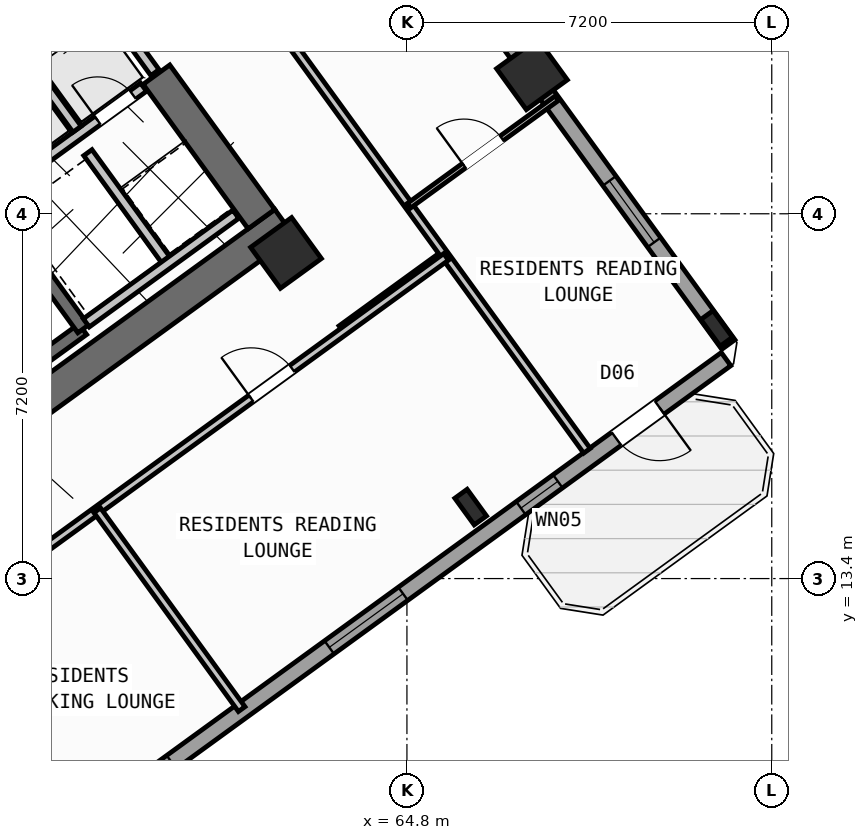
"""IFC4 building model, lengths in metres.
Left out: names, types, materials, properties, quantities, classifications, styles, units other than length and angle.
Written with IfcOpenShell. Run it as: python <this file> out.ifc"""

import sys

from ifc_helpers import new_model, si_unit, direction, frame, frame_2d, origin, origin_2d, place, context, subcontext, project, spatial, rectangle, hollow_rectangle, i_section, extrude, source, transform, mapped, element, fill, save


model = new_model("IFC4")
c1 = context("Model", 3, precision=1e-05, world=origin(), true_north=direction((0.0, 1.0)))
c2 = subcontext(c1, "Body", "Model", "MODEL_VIEW")
j1 = project(units=[si_unit("LENGTHUNIT", "METRE"), si_unit("PLANEANGLEUNIT", "RADIAN")], contexts=[c1])
p1 = place(None, origin())
s1 = spatial("IfcSite", under=j1, at=p1, CompositionType="ELEMENT")
p2 = place(p1, origin())
s2 = spatial("IfcBuilding", under=s1, at=p2, CompositionType="ELEMENT")
p3 = place(p2, frame((0.0, 0.0, 42.0)))
s3 = spatial("IfcBuildingStorey", under=s2, at=p3, CompositionType="ELEMENT", Elevation=42.0)
p4 = place(p3, frame((52.318, 13.11, 0.0), z_axis=(0.0, 0.0, 1.0), x_axis=(0.809019445368, 0.587781878776, 0.0)))
e1 = element("IfcWall", 1, at=p4, inside=s3, PredefinedType="SHEAR", context=c2, shape_type="SweptSolid", body=[
    extrude(rectangle(XDim=12.44, YDim=0.65, at=frame_2d((6.22, 0.0))), origin(), (0.0, 0.0, 1.0), 3.35),
])
p5 = place(p3, frame((61.929, 20.494, 0.0), z_axis=(0.0, 0.0, 1.0), x_axis=(-0.58782982593, 0.808984607855, 0.0)))
e2 = element("IfcWall", 2, at=p5, inside=s3, PredefinedType="SHEAR", context=c2, shape_type="SweptSolid", body=[
    extrude(rectangle(XDim=3.525, YDim=0.65, at=frame_2d((1.762, 0.0))), origin(), (0.0, 0.0, 1.0), 3.35),
])
m1 = source(origin(), c2, "Body", "SweptSolid", [
    extrude(i_section(OverallWidth=0.3, OverallDepth=0.65, WebThickness=0.016, FlangeThickness=0.031, at=origin_2d()), origin(), (0.0, 0.0, 1.0), 3.6),
])
p6 = place(p3, frame((66.058, 14.811, 0.0), z_axis=(0.0, 0.0, 1.0), x_axis=(0.809016994375, 0.587785252292, 0.0)))
e3 = element("IfcColumn", 3, at=p6, inside=s3, PredefinedType="COLUMN", context=c2, shape_type="MappedRepresentation", body=[
    mapped(m1, transform((0.0, 0.0, 0.0), scale=1.0)),
])
m2 = source(origin(), c2, "Body", "SweptSolid", [
    extrude(hollow_rectangle(XDim=1.0, YDim=1.0, WallThickness=0.04, at=origin_2d()), origin(), (0.0, 0.0, 1.0), 3.6),
])
p7 = place(p3, frame((62.414, 19.827, 0.0), z_axis=(0.0, 0.0, 1.0), x_axis=(0.809016994375, 0.587785252292, 0.0)))
e4 = element("IfcColumn", 4, at=p7, inside=s3, PredefinedType="COLUMN", context=c2, shape_type="MappedRepresentation", body=[
    mapped(m2, transform((0.0, 0.0, 0.0), scale=1.0)),
])
p8 = place(p3, frame((70.912, 18.338, 0.0), z_axis=(0.0, 0.0, 1.0), x_axis=(0.809016994375, 0.587785252292, 0.0)))
e5 = element("IfcColumn", 5, at=p8, inside=s3, PredefinedType="COLUMN", context=c2, shape_type="MappedRepresentation", body=[
    mapped(m1, transform((0.0, 0.0, 0.0), scale=1.0)),
])
p9 = place(p3, frame((67.268, 23.354, 0.0), z_axis=(0.0, 0.0, 1.0), x_axis=(0.809016994375, 0.587785252292, 0.0)))
e6 = element("IfcColumn", 6, at=p9, inside=s3, PredefinedType="COLUMN", context=c2, shape_type="MappedRepresentation", body=[
    mapped(m2, transform((0.0, 0.0, 0.0), scale=1.0)),
])
p10 = place(p3, frame((58.455, 35.484, 0.0), z_axis=(0.0, 0.0, 1.0), x_axis=(0.587783625747, -0.809018176127, 0.0)))
e7 = element("IfcWall", 7, at=p10, inside=s3, PredefinedType="STANDARD", context=c2, shape_type="SweptSolid", body=[
    extrude(rectangle(XDim=21.587, YDim=0.32, at=frame_2d((10.794, 0.0))), origin(), (0.0, 0.0, 1.0), 2.725),
])
p11 = place(p10, frame((1.529, 0.0, 0.85)))
e8 = element("IfcOpeningElement", 8, at=p11, cuts=e7, PredefinedType="OPENING", context=c2, shape_type="SweptSolid", body=[
    extrude(rectangle(XDim=1.8, YDim=1.5, at=frame_2d((0.9, 0.75))), frame((0.0, 0.17, 0.0), z_axis=(0.0, -1.0, 0.0), x_axis=(1.0, 0.0, 0.0)), (0.0, 0.0, 1.0), 0.34),
])
p12 = place(p10, frame((10.444, 0.0, 0.85)))
e9 = element("IfcOpeningElement", 9, at=p12, cuts=e7, PredefinedType="OPENING", context=c2, shape_type="SweptSolid", body=[
    extrude(rectangle(XDim=1.8, YDim=1.5, at=frame_2d((0.9, 0.75))), frame((0.0, 0.17, 0.0), z_axis=(0.0, -1.0, 0.0), x_axis=(1.0, 0.0, 0.0)), (0.0, 0.0, 1.0), 0.34),
])
p13 = place(p10, frame((17.595, 0.0, 0.85)))
e10 = element("IfcOpeningElement", 10, at=p13, cuts=e7, PredefinedType="OPENING", context=c2, shape_type="SweptSolid", body=[
    extrude(rectangle(XDim=1.5, YDim=1.5, at=frame_2d((0.75, 0.75))), frame((0.0, 0.17, 0.0), z_axis=(0.0, -1.0, 0.0), x_axis=(1.0, 0.0, 0.0)), (0.0, 0.0, 1.0), 0.34),
])
p14 = place(p3, frame((71.098, 17.731, 0.0), z_axis=(0.0, 0.0, 1.0), x_axis=(-0.809021120468, -0.587779573171, 0.0)))
e11 = element("IfcWall", 11, at=p14, inside=s3, PredefinedType="STANDARD", context=c2, shape_type="SweptSolid", body=[
    extrude(rectangle(XDim=17.588, YDim=0.32, at=frame_2d((8.794, 0.0))), origin(), (0.0, 0.0, 1.0), 3.35),
])
p15 = place(p14, frame((1.624, 0.0, 0.0)))
e12 = element("IfcOpeningElement", 12, at=p15, cuts=e11, PredefinedType="OPENING", context=c2, shape_type="SweptSolid", body=[
    extrude(rectangle(XDim=1.05, YDim=2.15, at=frame_2d((0.525, 1.075))), frame((0.0, 0.17, 0.0), z_axis=(0.0, -1.0, 0.0), x_axis=(1.0, 0.0, 0.0)), (0.0, 0.0, 1.0), 0.34),
])
p16 = place(p14, frame((4.104, 0.0, 1.0)))
e13 = element("IfcOpeningElement", 13, at=p16, cuts=e11, PredefinedType="OPENING", context=c2, shape_type="SweptSolid", body=[
    extrude(rectangle(XDim=0.9, YDim=1.25, at=frame_2d((0.45, 0.625))), frame((0.0, 0.17, 0.0), z_axis=(0.0, -1.0, 0.0), x_axis=(1.0, 0.0, 0.0)), (0.0, 0.0, 1.0), 0.34),
])
p17 = place(p14, frame((7.879, 0.0, 0.85)))
e14 = element("IfcOpeningElement", 14, at=p17, cuts=e11, PredefinedType="OPENING", context=c2, shape_type="SweptSolid", body=[
    extrude(rectangle(XDim=1.8, YDim=1.5, at=frame_2d((0.9, 0.75))), frame((0.0, 0.17, 0.0), z_axis=(0.0, -1.0, 0.0), x_axis=(1.0, 0.0, 0.0)), (0.0, 0.0, 1.0), 0.34),
])
p18 = place(p14, frame((13.529, 0.0, 0.85)))
e15 = element("IfcOpeningElement", 15, at=p18, cuts=e11, PredefinedType="OPENING", context=c2, shape_type="SweptSolid", body=[
    extrude(rectangle(XDim=1.5, YDim=1.5, at=frame_2d((0.75, 0.75))), frame((0.0, 0.17, 0.0), z_axis=(0.0, -1.0, 0.0), x_axis=(1.0, 0.0, 0.0)), (0.0, 0.0, 1.0), 0.34),
])
p19 = place(p3, frame((52.472, 14.013, 0.0), z_axis=(0.0, 0.0, 1.0), x_axis=(0.809028366311, 0.587769599847, 0.0)))
e16 = element("IfcWall", 16, at=p19, inside=s3, PredefinedType="SHEAR", context=c2, shape_type="SweptSolid", body=[
    extrude(rectangle(XDim=7.33, YDim=0.26, at=frame_2d((3.665, 0.0))), origin(), (0.0, 0.0, 1.0), 3.35),
])
p20 = place(p3, frame((58.41, 18.327, 0.0), z_axis=(0.0, 0.0, 1.0), x_axis=(-0.58776738483, 0.809029975545, 0.0)))
e17 = element("IfcWall", 17, at=p20, inside=s3, PredefinedType="SHEAR", context=c2, shape_type="SweptSolid", body=[
    extrude(rectangle(XDim=3.16, YDim=0.26, at=frame_2d((1.58, 0.0))), origin(), (0.0, 0.0, 1.0), 3.35),
])
p21 = place(p3, frame((56.553, 20.884, 0.0), z_axis=(0.0, 0.0, 1.0), x_axis=(0.809035789462, 0.587759382205, 0.0)))
e18 = element("IfcWall", 18, at=p21, inside=s3, PredefinedType="STANDARD", context=c2, shape_type="SweptSolid", body=[
    extrude(rectangle(XDim=3.768, YDim=0.2, at=frame_2d((1.884, 0.0))), origin(), (0.0, 0.0, 1.0), 3.34),
])
p22 = place(p21, frame((2.65, 0.0, 0.0)))
e19 = element("IfcOpeningElement", 19, at=p22, cuts=e18, PredefinedType="OPENING", context=c2, shape_type="SweptSolid", body=[
    extrude(rectangle(XDim=0.86, YDim=2.05, at=frame_2d((0.43, 1.025))), frame((0.0, 0.11, 0.0), z_axis=(0.0, -1.0, 0.0), x_axis=(1.0, 0.0, 0.0)), (0.0, 0.0, 1.0), 0.22),
])
p23 = place(p3, frame((54.421, 21.436, 0.0), z_axis=(0.0, 0.0, 1.0), x_axis=(0.809013710463, 0.587789772183, 0.0)))
e20 = element("IfcWall", 20, at=p23, inside=s3, PredefinedType="STANDARD", context=c2, shape_type="SweptSolid", body=[
    extrude(rectangle(XDim=5.36, YDim=0.2, at=frame_2d((2.68, 0.0))), origin(), (0.0, 0.0, 1.0), 3.34),
])
p24 = place(p23, frame((0.37, 0.0, 0.0)))
e21 = element("IfcOpeningElement", 21, at=p24, cuts=e20, PredefinedType="OPENING", context=c2, shape_type="SweptSolid", body=[
    extrude(rectangle(XDim=1.1, YDim=2.15, at=frame_2d((0.55, 1.075))), frame((0.0, 0.11, 0.0), z_axis=(0.0, -1.0, 0.0), x_axis=(1.0, 0.0, 0.0)), (0.0, 0.0, 1.0), 0.22),
])
p25 = place(p23, frame((2.17, 0.0, 0.0)))
e22 = element("IfcOpeningElement", 22, at=p25, cuts=e20, PredefinedType="OPENING", context=c2, shape_type="SweptSolid", body=[
    extrude(rectangle(XDim=1.1, YDim=2.15, at=frame_2d((0.55, 1.075))), frame((0.0, 0.11, 0.0), z_axis=(0.0, -1.0, 0.0), x_axis=(1.0, 0.0, 0.0)), (0.0, 0.0, 1.0), 0.22),
])
p26 = place(p23, frame((3.97, 0.0, 0.0)))
e23 = element("IfcOpeningElement", 23, at=p26, cuts=e20, PredefinedType="OPENING", context=c2, shape_type="SweptSolid", body=[
    extrude(rectangle(XDim=1.1, YDim=2.15, at=frame_2d((0.55, 1.075))), frame((0.0, 0.11, 0.0), z_axis=(0.0, -1.0, 0.0), x_axis=(1.0, 0.0, 0.0)), (0.0, 0.0, 1.0), 0.22),
])
p27 = place(p3, frame((58.29, 22.27, 0.0), z_axis=(0.0, 0.0, 1.0), x_axis=(-0.587840865826, 0.808976585857, 0.0)))
e24 = element("IfcWall", 24, at=p27, inside=s3, PredefinedType="STANDARD", context=c2, shape_type="SweptSolid", body=[
    extrude(rectangle(XDim=1.58, YDim=0.2, at=frame_2d((0.79, 0.0))), origin(), (0.0, 0.0, 1.0), 3.34),
])
p28 = place(p3, frame((60.067, 19.655, 0.0), z_axis=(0.0, 0.0, 1.0), x_axis=(-0.587800520745, 0.809005900975, 0.0)))
e25 = element("IfcWall", 25, at=p28, inside=s3, PredefinedType="STANDARD", context=c2, shape_type="SweptSolid", body=[
    extrude(rectangle(XDim=2.66, YDim=0.2, at=frame_2d((1.33, 0.0))), origin(), (0.0, 0.0, 1.0), 3.34),
])
p29 = place(p3, frame((58.472, 18.447, 0.0), z_axis=(0.0, 0.0, 1.0), x_axis=(0.809022487728, 0.587777691266, 0.0)))
e26 = element("IfcWall", 26, at=p29, inside=s3, PredefinedType="STANDARD", context=c2, shape_type="SweptSolid", body=[
    extrude(rectangle(XDim=3.648, YDim=0.2, at=frame_2d((1.824, 0.0))), origin(), (0.0, 0.0, 1.0), 3.34),
])
p30 = place(p3, frame((53.425, 22.468, 0.0), z_axis=(0.0, 0.0, 1.0), x_axis=(0.80902705128, 0.587771409902, 0.0)))
e27 = element("IfcWall", 27, at=p30, inside=s3, PredefinedType="STANDARD", context=c2, shape_type="SweptSolid", body=[
    extrude(rectangle(XDim=5.368, YDim=0.2, at=frame_2d((2.684, 0.0))), origin(), (0.0, 0.0, 1.0), 3.34),
])
p31 = place(p30, frame((4.28, 0.0, 0.0)))
e28 = element("IfcOpeningElement", 28, at=p31, cuts=e27, PredefinedType="OPENING", context=c2, shape_type="SweptSolid", body=[
    extrude(rectangle(XDim=0.86, YDim=2.05, at=frame_2d((0.43, 1.025))), frame((0.0, 0.11, 0.0), z_axis=(0.0, -1.0, 0.0), x_axis=(1.0, 0.0, 0.0)), (0.0, 0.0, 1.0), 0.22),
])
p32 = place(p30, frame((0.35, 0.0, 0.0)))
e29 = element("IfcOpeningElement", 29, at=p32, cuts=e27, PredefinedType="OPENING", context=c2, shape_type="SweptSolid", body=[
    extrude(rectangle(XDim=0.86, YDim=2.05, at=frame_2d((0.43, 1.025))), frame((0.0, 0.11, 0.0), z_axis=(0.0, -1.0, 0.0), x_axis=(1.0, 0.0, 0.0)), (0.0, 0.0, 1.0), 0.22),
])
p33 = place(p3, frame((59.827, 23.386, 0.0), z_axis=(0.0, 0.0, 1.0), x_axis=(-0.587803840107, 0.809003489211, 0.0)))
e30 = element("IfcWall", 30, at=p33, inside=s3, PredefinedType="STANDARD", context=c2, shape_type="SweptSolid", body=[
    extrude(rectangle(XDim=2.96, YDim=0.2, at=frame_2d((1.48, 0.0))), origin(), (0.0, 0.0, 1.0), 3.34),
])
p34 = place(p33, frame((1.68, 0.0, 0.0)))
e31 = element("IfcOpeningElement", 31, at=p34, cuts=e30, PredefinedType="OPENING", context=c2, shape_type="SweptSolid", body=[
    extrude(rectangle(XDim=1.0, YDim=2.1, at=frame_2d((0.5, 1.05))), frame((0.0, 0.11, 0.0), z_axis=(0.0, -1.0, 0.0), x_axis=(1.0, 0.0, 0.0)), (0.0, 0.0, 1.0), 0.22),
])
p35 = place(p3, frame((63.507, 18.322, 0.0), z_axis=(0.0, 0.0, 1.0), x_axis=(0.809034604122, 0.587761013791, 0.0)))
e32 = element("IfcWall", 32, at=p35, inside=s3, PredefinedType="PARTITIONING", context=c2, shape_type="SweptSolid", body=[
    extrude(rectangle(XDim=2.51, YDim=0.16, at=frame_2d((1.255, 0.0))), origin(), (0.0, 0.0, 1.0), 3.34),
])
p36 = place(p3, frame((68.353, 15.922, 0.0), z_axis=(0.0, 0.0, 1.0), x_axis=(-0.587782002009, 0.809019355834, 0.0)))
e33 = element("IfcWall", 33, at=p36, inside=s3, PredefinedType="PARTITIONING", context=c2, shape_type="SweptSolid", body=[
    extrude(rectangle(XDim=15.35, YDim=0.16, at=frame_2d((7.675, 0.0))), origin(), (0.0, 0.0, 1.0), 3.34),
])
p37 = place(p3, frame((64.839, 20.759, 0.0), z_axis=(0.0, 0.0, 1.0), x_axis=(0.809013833588, 0.587789602718, 0.0)))
e34 = element("IfcWall", 34, at=p37, inside=s3, PredefinedType="PARTITIONING", context=c2, shape_type="SweptSolid", body=[
    extrude(rectangle(XDim=3.61, YDim=0.11, at=frame_2d((1.805, 0.0))), origin(), (0.0, 0.0, 1.0), 3.34),
])
p38 = place(p37, frame((1.345, 0.0, 0.0)))
e35 = element("IfcOpeningElement", 35, at=p38, cuts=e34, PredefinedType="OPENING", context=c2, shape_type="SweptSolid", body=[
    extrude(rectangle(XDim=0.92, YDim=2.08, at=frame_2d((0.46, 1.04))), frame((0.0, 0.065, 0.0), z_axis=(0.0, -1.0, 0.0), x_axis=(1.0, 0.0, 0.0)), (0.0, 0.0, 1.0), 0.13),
])
p39 = place(p3, frame((53.705, 11.126, 0.0), z_axis=(0.0, 0.0, 1.0), x_axis=(0.809014504436, 0.587788679384, 0.0)))
e36 = element("IfcWall", 36, at=p39, inside=s3, PredefinedType="PARTITIONING", context=c2, shape_type="SweptSolid", body=[
    extrude(rectangle(XDim=14.67, YDim=0.16, at=frame_2d((7.335, 0.0))), origin(), (0.0, 0.0, 1.0), 3.34),
])
p40 = place(p39, frame((3.215, 0.0, 0.0)))
e37 = element("IfcOpeningElement", 37, at=p40, cuts=e36, PredefinedType="OPENING", context=c2, shape_type="SweptSolid", body=[
    extrude(rectangle(XDim=1.0, YDim=2.1, at=frame_2d((0.5, 1.05))), frame((0.0, 0.09, 0.0), z_axis=(0.0, -1.0, 0.0), x_axis=(1.0, 0.0, 0.0)), (0.0, 0.0, 1.0), 0.18),
])
p41 = place(p39, frame((9.915, 0.0, 0.0)))
e38 = element("IfcOpeningElement", 38, at=p41, cuts=e36, PredefinedType="OPENING", context=c2, shape_type="SweptSolid", body=[
    extrude(rectangle(XDim=1.0, YDim=2.1, at=frame_2d((0.5, 1.05))), frame((0.0, 0.09, 0.0), z_axis=(0.0, -1.0, 0.0), x_axis=(1.0, 0.0, 0.0)), (0.0, 0.0, 1.0), 0.18),
])
p42 = place(p3, frame((57.747, 7.586, 0.0), z_axis=(0.0, 0.0, 1.0), x_axis=(-0.587784893399, 0.809017255126, 0.0)))
e39 = element("IfcWall", 39, at=p42, inside=s3, PredefinedType="PARTITIONING", context=c2, shape_type="SweptSolid", body=[
    extrude(rectangle(XDim=5.48, YDim=0.16, at=frame_2d((2.74, 0.0))), origin(), (0.0, 0.0, 1.0), 3.34),
])
p43 = place(p3, frame((61.539, 10.823, 0.0), z_axis=(0.0, 0.0, 1.0), x_axis=(-0.587785532001, 0.809016791155, 0.0)))
e40 = element("IfcWall", 40, at=p43, inside=s3, PredefinedType="PARTITIONING", context=c2, shape_type="SweptSolid", body=[
    extrude(rectangle(XDim=4.85, YDim=0.16, at=frame_2d((2.425, 0.0))), origin(), (0.0, 0.0, 1.0), 3.34),
])
m3 = source(origin(), c2, "Body", "SweptSolid", [
    extrude(rectangle(XDim=1.05, YDim=2.15, at=frame_2d((0.525, 1.075))), frame((0.0, 0.025, 0.0), z_axis=(0.0, -1.0, 0.0), x_axis=(1.0, 0.0, 0.0)), (0.0, 0.0, 1.0), 0.05),
])
p44 = place(p15, origin())
e41 = element("IfcDoor", 41, at=p44, inside=s3, OperationType="SINGLE_SWING_LEFT", PredefinedType="DOOR", context=c2, shape_type="MappedRepresentation", body=[
    mapped(m3, transform((0.0, 0.0, 0.0), scale=1.0)),
])
fill(e12, e41)
m4 = source(origin(), c2, "Body", "SweptSolid", [
    extrude(rectangle(XDim=1.5, YDim=1.5, at=frame_2d((0.75, 0.75))), frame((0.0, 0.03, 0.0), z_axis=(0.0, -1.0, 0.0), x_axis=(1.0, 0.0, 0.0)), (0.0, 0.0, 1.0), 0.06),
])
p45 = place(p13, origin())
e42 = element("IfcWindow", 42, at=p45, inside=s3, PartitioningType="SINGLE_PANEL", PredefinedType="WINDOW", context=c2, shape_type="MappedRepresentation", body=[
    mapped(m4, transform((0.0, 0.0, 0.0), scale=1.0)),
])
fill(e10, e42)
m5 = source(origin(), c2, "Body", "SweptSolid", [
    extrude(rectangle(XDim=0.9, YDim=1.25, at=frame_2d((0.45, 0.625))), frame((0.0, 0.03, 0.0), z_axis=(0.0, -1.0, 0.0), x_axis=(1.0, 0.0, 0.0)), (0.0, 0.0, 1.0), 0.06),
])
p46 = place(p16, origin())
e43 = element("IfcWindow", 43, at=p46, inside=s3, PartitioningType="SINGLE_PANEL", PredefinedType="WINDOW", context=c2, shape_type="MappedRepresentation", body=[
    mapped(m5, transform((0.0, 0.0, 0.0), scale=1.0)),
])
fill(e13, e43)
m6 = source(origin(), c2, "Body", "SweptSolid", [
    extrude(rectangle(XDim=1.8, YDim=1.5, at=frame_2d((0.9, 0.75))), frame((0.0, 0.03, 0.0), z_axis=(0.0, -1.0, 0.0), x_axis=(1.0, 0.0, 0.0)), (0.0, 0.0, 1.0), 0.06),
])
p47 = place(p17, origin())
e44 = element("IfcWindow", 44, at=p47, inside=s3, PartitioningType="SINGLE_PANEL", PredefinedType="WINDOW", context=c2, shape_type="MappedRepresentation", body=[
    mapped(m6, transform((0.0, 0.0, 0.0), scale=1.0)),
])
fill(e14, e44)
m7 = source(origin(), c2, "Body", "SweptSolid", [
    extrude(rectangle(XDim=1.1, YDim=2.15, at=frame_2d((0.55, 1.075))), frame((0.0, 0.025, 0.0), z_axis=(0.0, -1.0, 0.0), x_axis=(1.0, 0.0, 0.0)), (0.0, 0.0, 1.0), 0.05),
])
p48 = place(p26, origin())
e45 = element("IfcDoor", 45, at=p48, inside=s3, OperationType="DOUBLE_DOOR_SLIDING", PredefinedType="DOOR", context=c2, shape_type="MappedRepresentation", body=[
    mapped(m7, transform((0.0, 0.0, 0.0), scale=1.0)),
])
fill(e23, e45)
m8 = source(origin(), c2, "Body", "SweptSolid", [
    extrude(rectangle(XDim=0.86, YDim=2.05, at=frame_2d((0.43, 1.025))), frame((0.0, 0.025, 0.0), z_axis=(0.0, -1.0, 0.0), x_axis=(1.0, 0.0, 0.0)), (0.0, 0.0, 1.0), 0.05),
])
p49 = place(p22, origin())
e46 = element("IfcDoor", 46, at=p49, inside=s3, OperationType="SINGLE_SWING_LEFT", PredefinedType="DOOR", context=c2, shape_type="MappedRepresentation", body=[
    mapped(m8, transform((0.0, 0.0, 0.0), scale=1.0)),
])
fill(e19, e46)
m9 = source(origin(), c2, "Body", "SweptSolid", [
    extrude(rectangle(XDim=0.92, YDim=2.08, at=frame_2d((0.46, 1.04))), frame((0.0, 0.025, 0.0), z_axis=(0.0, -1.0, 0.0), x_axis=(1.0, 0.0, 0.0)), (0.0, 0.0, 1.0), 0.05),
])
p50 = place(p38, origin())
e47 = element("IfcDoor", 47, at=p50, inside=s3, OperationType="SINGLE_SWING_LEFT", PredefinedType="DOOR", context=c2, shape_type="MappedRepresentation", body=[
    mapped(m9, transform((0.0, 0.0, 0.0), scale=1.0)),
])
fill(e35, e47)
m10 = source(origin(), c2, "Body", "SweptSolid", [
    extrude(rectangle(XDim=1.0, YDim=2.1, at=frame_2d((0.5, 1.05))), frame((0.0, 0.025, 0.0), z_axis=(0.0, -1.0, 0.0), x_axis=(1.0, 0.0, 0.0)), (0.0, 0.0, 1.0), 0.05),
])
p51 = place(p41, origin())
e48 = element("IfcDoor", 48, at=p51, inside=s3, OperationType="SINGLE_SWING_LEFT", PredefinedType="DOOR", context=c2, shape_type="MappedRepresentation", body=[
    mapped(m10, transform((0.0, 0.0, 0.0), scale=1.0)),
])
fill(e38, e48)
save(model, sys.argv[1])
